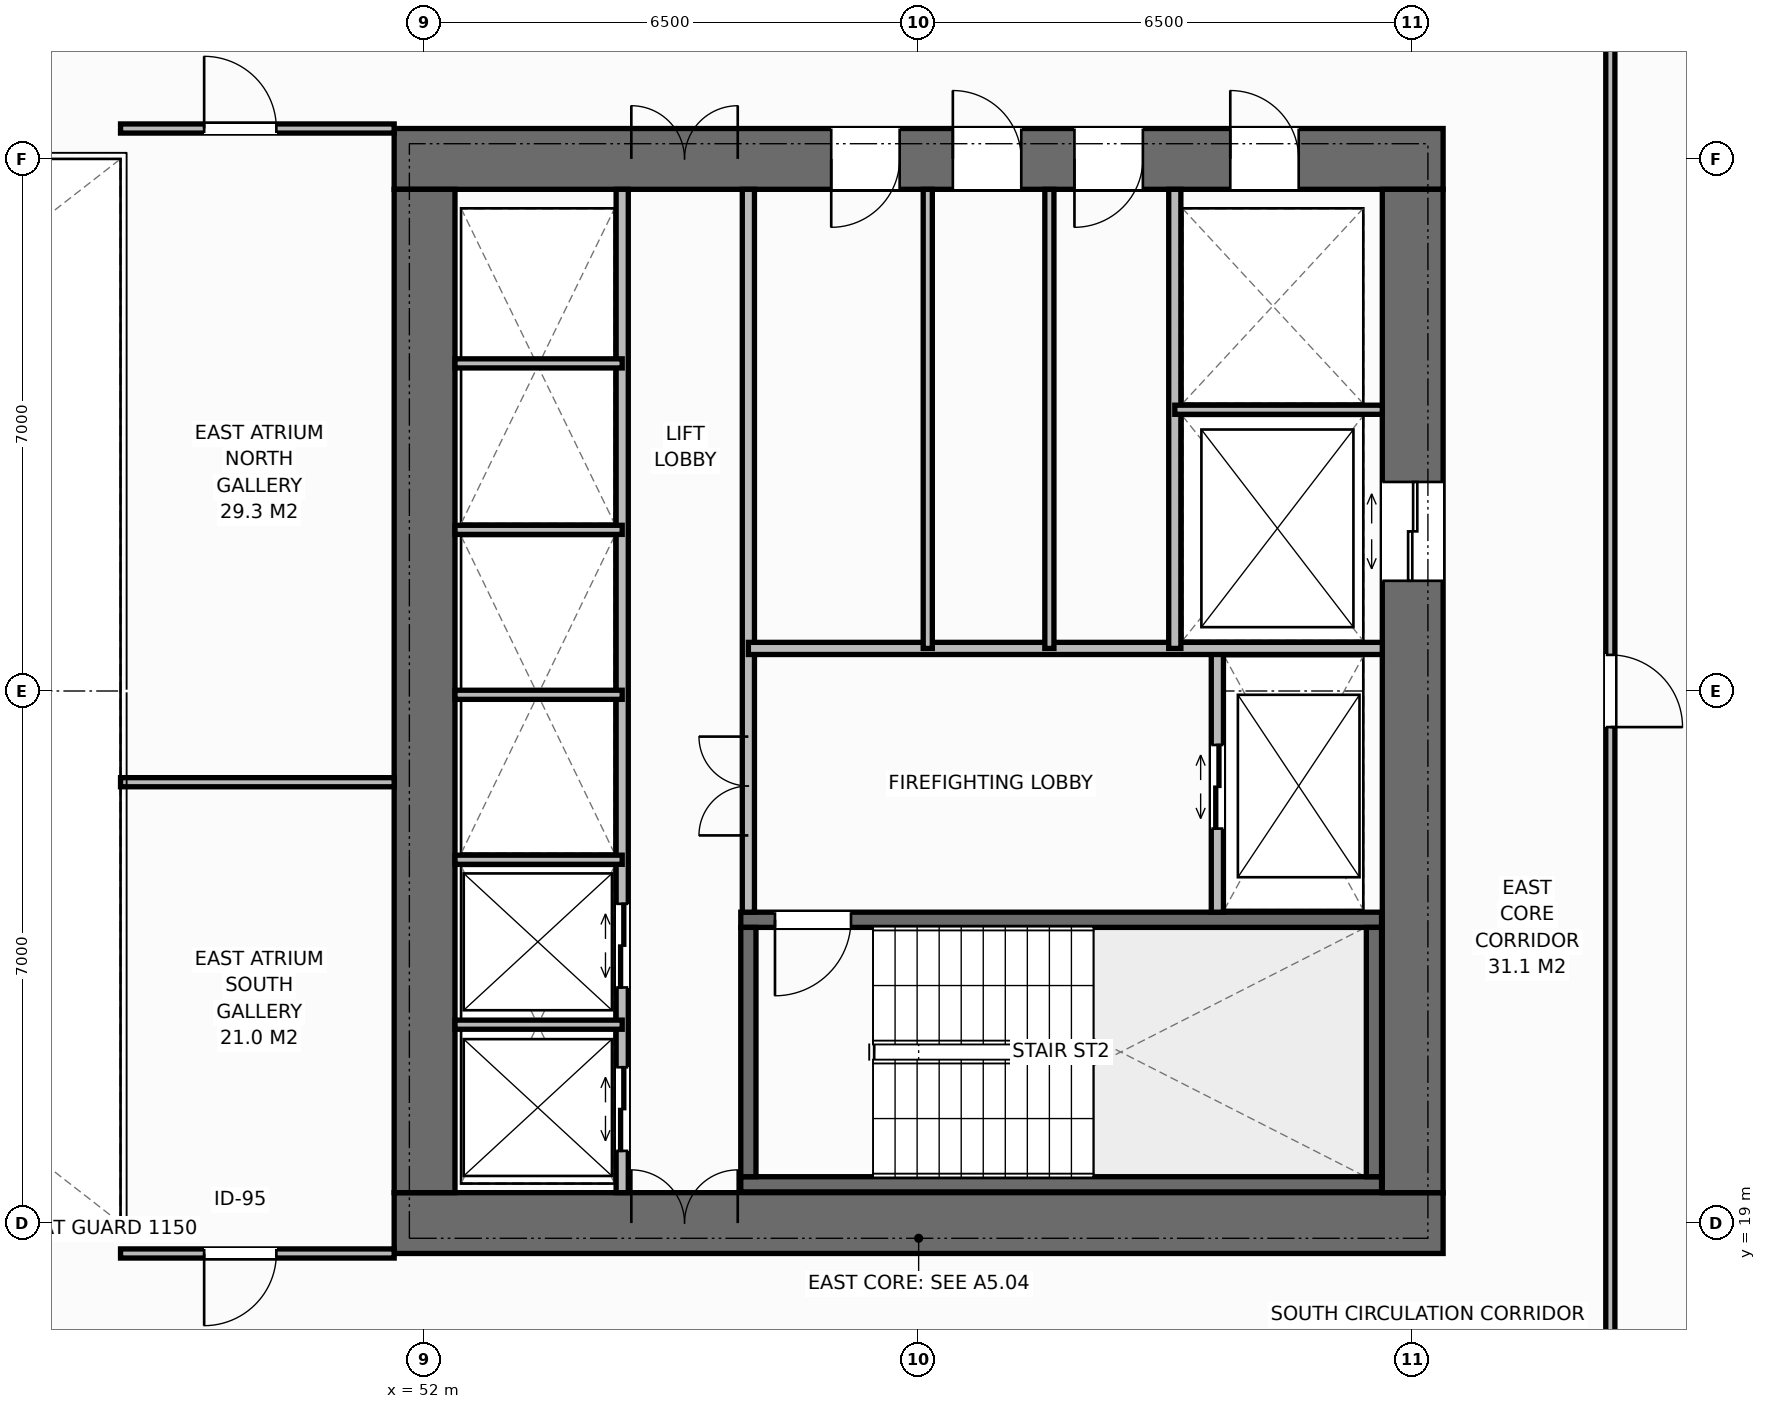
"""IFC4 building model, lengths in metres.
Left out: names, types, materials, properties, quantities, classifications, styles, units other than length and angle.
Written with IfcOpenShell. Run it as: python <this file> out.ifc"""

import sys

from ifc_helpers import new_model, si_unit, direction, frame, frame_2d, origin, place, context, subcontext, project, spatial, rectangle, extrude, element, fill, save


model = new_model("IFC4")
c1 = context("Model", 3, precision=1e-05, world=origin(), true_north=direction((0.0, 1.0)))
c2 = subcontext(c1, "Body", "Model", "MODEL_VIEW")
j1 = project(units=[si_unit("LENGTHUNIT", "METRE"), si_unit("PLANEANGLEUNIT", "RADIAN")], contexts=[c1])
p1 = place(None, origin())
s1 = spatial("IfcSite", under=j1, at=p1, CompositionType="ELEMENT")
p2 = place(p1, origin())
s2 = spatial("IfcBuilding", under=s1, at=p2, CompositionType="ELEMENT")
p3 = place(p2, frame((0.0, 0.0, 46.8)))
s3 = spatial("IfcBuildingStorey", under=s2, at=p3, CompositionType="ELEMENT", Elevation=46.8)
p4 = place(p3, frame((51.6, 19.0, 0.0), z_axis=(0.0, 0.0, 1.0), x_axis=(1.0, 0.0, 0.0)))
e1 = element("IfcWall", 1, at=p4, inside=s3, PredefinedType="SHEAR", context=c2, shape_type="SweptSolid", body=[
    extrude(rectangle(XDim=13.8, YDim=0.8, at=frame_2d((6.9, 0.0))), origin(), (0.0, 0.0, 1.0), 3.8),
])
p5 = place(p4, frame((3.12, 0.0, 0.0)))
e2 = element("IfcOpeningElement", 2, at=p5, cuts=e1, PredefinedType="OPENING", context=c2, shape_type="SweptSolid", body=[
    extrude(rectangle(XDim=1.4, YDim=2.2, at=frame_2d((0.7, 1.1))), frame((0.0, 0.41, 0.0), z_axis=(0.0, -1.0, 0.0), x_axis=(1.0, 0.0, 0.0)), (0.0, 0.0, 1.0), 0.82),
])
p6 = place(p3, frame((51.6, 33.0, 0.0), z_axis=(0.0, 0.0, 1.0), x_axis=(1.0, 0.0, 0.0)))
e3 = element("IfcWall", 3, at=p6, inside=s3, PredefinedType="SHEAR", context=c2, shape_type="SweptSolid", body=[
    extrude(rectangle(XDim=13.8, YDim=0.8, at=frame_2d((6.9, 0.0))), origin(), (0.0, 0.0, 1.0), 3.8),
])
p7 = place(p6, frame((3.12, 0.0, 0.0)))
e4 = element("IfcOpeningElement", 4, at=p7, cuts=e3, PredefinedType="OPENING", context=c2, shape_type="SweptSolid", body=[
    extrude(rectangle(XDim=1.4, YDim=2.2, at=frame_2d((0.7, 1.1))), frame((0.0, 0.41, 0.0), z_axis=(0.0, -1.0, 0.0), x_axis=(1.0, 0.0, 0.0)), (0.0, 0.0, 1.0), 0.82),
])
p8 = place(p6, frame((11.0, 0.0, 0.0)))
e5 = element("IfcOpeningElement", 5, at=p8, cuts=e3, PredefinedType="OPENING", context=c2, shape_type="SweptSolid", body=[
    extrude(rectangle(XDim=0.9, YDim=2.15, at=frame_2d((0.45, 1.075))), frame((0.0, 0.41, 0.0), z_axis=(0.0, -1.0, 0.0), x_axis=(1.0, 0.0, 0.0)), (0.0, 0.0, 1.0), 0.82),
])
p9 = place(p6, frame((5.75, 0.0, 0.0)))
e6 = element("IfcOpeningElement", 6, at=p9, cuts=e3, PredefinedType="OPENING", context=c2, shape_type="SweptSolid", body=[
    extrude(rectangle(XDim=0.9, YDim=2.15, at=frame_2d((0.45, 1.075))), frame((0.0, 0.41, 0.0), z_axis=(0.0, -1.0, 0.0), x_axis=(1.0, 0.0, 0.0)), (0.0, 0.0, 1.0), 0.82),
])
p10 = place(p6, frame((7.35, 0.0, 0.0)))
e7 = element("IfcOpeningElement", 7, at=p10, cuts=e3, PredefinedType="OPENING", context=c2, shape_type="SweptSolid", body=[
    extrude(rectangle(XDim=0.9, YDim=2.15, at=frame_2d((0.45, 1.075))), frame((0.0, 0.41, 0.0), z_axis=(0.0, -1.0, 0.0), x_axis=(1.0, 0.0, 0.0)), (0.0, 0.0, 1.0), 0.82),
])
p11 = place(p6, frame((8.95, 0.0, 0.0)))
e8 = element("IfcOpeningElement", 8, at=p11, cuts=e3, PredefinedType="OPENING", context=c2, shape_type="SweptSolid", body=[
    extrude(rectangle(XDim=0.9, YDim=2.15, at=frame_2d((0.45, 1.075))), frame((0.0, 0.41, 0.0), z_axis=(0.0, -1.0, 0.0), x_axis=(1.0, 0.0, 0.0)), (0.0, 0.0, 1.0), 0.82),
])
p12 = place(p3, frame((52.0, 19.4, 0.0), z_axis=(0.0, 0.0, 1.0), x_axis=(0.0, 1.0, 0.0)))
e9 = element("IfcWall", 9, at=p12, inside=s3, PredefinedType="SHEAR", context=c2, shape_type="SweptSolid", body=[
    extrude(rectangle(XDim=13.2, YDim=0.8, at=frame_2d((6.6, 0.0))), origin(), (0.0, 0.0, 1.0), 3.8),
])
p13 = place(p3, frame((65.0, 19.4, 0.0), z_axis=(0.0, 0.0, 1.0), x_axis=(0.0, 1.0, 0.0)))
e10 = element("IfcWall", 10, at=p13, inside=s3, PredefinedType="SHEAR", context=c2, shape_type="SweptSolid", body=[
    extrude(rectangle(XDim=13.2, YDim=0.8, at=frame_2d((6.6, 0.0))), origin(), (0.0, 0.0, 1.0), 3.8),
])
p14 = place(p13, frame((8.05, 0.0, 0.0)))
e11 = element("IfcOpeningElement", 11, at=p14, cuts=e10, PredefinedType="OPENING", context=c2, shape_type="SweptSolid", body=[
    extrude(rectangle(XDim=1.3, YDim=2.2, at=frame_2d((0.65, 1.1))), frame((0.0, 0.41, 0.0), z_axis=(0.0, -1.0, 0.0), x_axis=(1.0, 0.0, 0.0)), (0.0, 0.0, 1.0), 0.82),
])
p15 = place(p3, frame((56.16, 19.51, 0.0), z_axis=(0.0, 0.0, 1.0), x_axis=(1.0, 0.0, 0.0)))
e12 = element("IfcWall", 12, at=p15, inside=s3, PredefinedType="SHEAR", context=c2, shape_type="SweptSolid", body=[
    extrude(rectangle(XDim=8.43, YDim=0.2, at=frame_2d((4.215, 0.0))), origin(), (0.0, 0.0, 1.0), 3.8),
])
p16 = place(p3, frame((56.16, 22.99, 0.0), z_axis=(0.0, 0.0, 1.0), x_axis=(1.0, 0.0, 0.0)))
e13 = element("IfcWall", 13, at=p16, inside=s3, PredefinedType="SHEAR", context=c2, shape_type="SweptSolid", body=[
    extrude(rectangle(XDim=8.43, YDim=0.2, at=frame_2d((4.215, 0.0))), origin(), (0.0, 0.0, 1.0), 3.8),
])
p17 = place(p16, frame((0.45, 0.0, 0.0)))
e14 = element("IfcOpeningElement", 14, at=p17, cuts=e13, PredefinedType="OPENING", context=c2, shape_type="SweptSolid", body=[
    extrude(rectangle(XDim=1.0, YDim=2.15, at=frame_2d((0.5, 1.075))), frame((0.0, 0.11, 0.0), z_axis=(0.0, -1.0, 0.0), x_axis=(1.0, 0.0, 0.0)), (0.0, 0.0, 1.0), 0.22),
])
for number, where, z_axis, x_axis in (
    (15, (56.26, 19.61, 0.0), (0.0, 0.0, 1.0), (0.0, 1.0, 0.0)),
    (16, (64.49, 19.61, 0.0), (0.0, 0.0, 1.0), (0.0, 1.0, 0.0)),
):
    element("IfcWall", number, at=place(p3, frame(where, z_axis=z_axis, x_axis=x_axis)), inside=s3, PredefinedType="SHEAR", context=c2, shape_type="SweptSolid", body=[
        extrude(rectangle(XDim=3.28, YDim=0.2, at=frame_2d((1.64, 0.0))), origin(), (0.0, 0.0, 1.0), 3.8),
    ])
p18 = place(p3, frame((54.6, 19.4, 0.0), z_axis=(0.0, 0.0, 1.0), x_axis=(0.0, 1.0, 0.0)))
e17 = element("IfcWall", 17, at=p18, inside=s3, PredefinedType="STANDARD", context=c2, shape_type="SweptSolid", body=[
    extrude(rectangle(XDim=13.2, YDim=0.16, at=frame_2d((6.6, 0.0))), origin(), (0.0, 0.0, 1.0), 3.55),
])
p19 = place(p18, frame((0.55, 0.0, 0.0)))
e18 = element("IfcOpeningElement", 18, at=p19, cuts=e17, PredefinedType="OPENING", context=c2, shape_type="SweptSolid", body=[
    extrude(rectangle(XDim=1.1, YDim=2.2, at=frame_2d((0.55, 1.1))), frame((0.0, 0.09, 0.0), z_axis=(0.0, -1.0, 0.0), x_axis=(1.0, 0.0, 0.0)), (0.0, 0.0, 1.0), 0.18),
])
p20 = place(p18, frame((2.7, 0.0, 0.0)))
e19 = element("IfcOpeningElement", 19, at=p20, cuts=e17, PredefinedType="OPENING", context=c2, shape_type="SweptSolid", body=[
    extrude(rectangle(XDim=1.1, YDim=2.2, at=frame_2d((0.55, 1.1))), frame((0.0, 0.09, 0.0), z_axis=(0.0, -1.0, 0.0), x_axis=(1.0, 0.0, 0.0)), (0.0, 0.0, 1.0), 0.18),
])
p21 = place(p3, frame((56.26, 23.09, 0.0), z_axis=(0.0, 0.0, 1.0), x_axis=(0.0, 1.0, 0.0)))
e20 = element("IfcWall", 20, at=p21, inside=s3, PredefinedType="STANDARD", context=c2, shape_type="SweptSolid", body=[
    extrude(rectangle(XDim=9.51, YDim=0.16, at=frame_2d((4.755, 0.0))), origin(), (0.0, 0.0, 1.0), 3.55),
])
p22 = place(p21, frame((1.01, 0.0, 0.0)))
e21 = element("IfcOpeningElement", 21, at=p22, cuts=e20, PredefinedType="OPENING", context=c2, shape_type="SweptSolid", body=[
    extrude(rectangle(XDim=1.3, YDim=2.2, at=frame_2d((0.65, 1.1))), frame((0.0, 0.09, 0.0), z_axis=(0.0, -1.0, 0.0), x_axis=(1.0, 0.0, 0.0)), (0.0, 0.0, 1.0), 0.18),
])
for number, where, z_axis, x_axis in (
    (22, (52.4, 21.61, 0.0), (0.0, 0.0, 1.0), (1.0, 0.0, 0.0)),
    (23, (52.4, 23.78, 0.0), (0.0, 0.0, 1.0), (1.0, 0.0, 0.0)),
    (24, (52.4, 25.95, 0.0), (0.0, 0.0, 1.0), (1.0, 0.0, 0.0)),
    (25, (52.4, 28.12, 0.0), (0.0, 0.0, 1.0), (1.0, 0.0, 0.0)),
    (26, (52.4, 30.31, 0.0), (0.0, 0.0, 1.0), (1.0, 0.0, 0.0)),
):
    element("IfcWall", number, at=place(p3, frame(where, z_axis=z_axis, x_axis=x_axis)), inside=s3, PredefinedType="PARTITIONING", context=c2, shape_type="SweptSolid", body=[
        extrude(rectangle(XDim=2.2, YDim=0.12, at=frame_2d((1.1, 0.0))), origin(), (0.0, 0.0, 1.0), 3.55),
    ])
p23 = place(p3, frame((62.43, 23.09, 0.0), z_axis=(0.0, 0.0, 1.0), x_axis=(0.0, 1.0, 0.0)))
e27 = element("IfcWall", 27, at=p23, inside=s3, PredefinedType="STANDARD", context=c2, shape_type="SweptSolid", body=[
    extrude(rectangle(XDim=3.47, YDim=0.16, at=frame_2d((1.735, 0.0))), origin(), (0.0, 0.0, 1.0), 3.55),
])
p24 = place(p23, frame((1.1, 0.0, 0.0)))
e28 = element("IfcOpeningElement", 28, at=p24, cuts=e27, PredefinedType="OPENING", context=c2, shape_type="SweptSolid", body=[
    extrude(rectangle(XDim=1.1, YDim=2.2, at=frame_2d((0.55, 1.1))), frame((0.0, 0.09, 0.0), z_axis=(0.0, -1.0, 0.0), x_axis=(1.0, 0.0, 0.0)), (0.0, 0.0, 1.0), 0.18),
])
p25 = place(p3, frame((56.26, 26.56, 0.0), z_axis=(0.0, 0.0, 1.0), x_axis=(1.0, 0.0, 0.0)))
e29 = element("IfcWall", 29, at=p25, inside=s3, PredefinedType="STANDARD", context=c2, shape_type="SweptSolid", body=[
    extrude(rectangle(XDim=8.34, YDim=0.16, at=frame_2d((4.17, 0.0))), origin(), (0.0, 0.0, 1.0), 3.55),
])
p26 = place(p3, frame((61.87, 26.56, 0.0), z_axis=(0.0, 0.0, 1.0), x_axis=(0.0, 1.0, 0.0)))
e30 = element("IfcWall", 30, at=p26, inside=s3, PredefinedType="STANDARD", context=c2, shape_type="SweptSolid", body=[
    extrude(rectangle(XDim=6.04, YDim=0.16, at=frame_2d((3.02, 0.0))), origin(), (0.0, 0.0, 1.0), 3.55),
])
p27 = place(p3, frame((61.87, 29.7, 0.0), z_axis=(0.0, 0.0, 1.0), x_axis=(1.0, 0.0, 0.0)))
e31 = element("IfcWall", 31, at=p27, inside=s3, PredefinedType="PARTITIONING", context=c2, shape_type="SweptSolid", body=[
    extrude(rectangle(XDim=2.73, YDim=0.12, at=frame_2d((1.365, 0.0))), origin(), (0.0, 0.0, 1.0), 3.55),
])
for number, where, z_axis, x_axis in (
    (32, (58.62, 26.56, 0.0), (0.0, 0.0, 1.0), (0.0, 1.0, 0.0)),
    (33, (60.22, 26.56, 0.0), (0.0, 0.0, 1.0), (0.0, 1.0, 0.0)),
):
    element("IfcWall", number, at=place(p3, frame(where, z_axis=z_axis, x_axis=x_axis)), inside=s3, PredefinedType="PARTITIONING", context=c2, shape_type="SweptSolid", body=[
        extrude(rectangle(XDim=6.04, YDim=0.12, at=frame_2d((3.02, 0.0))), origin(), (0.0, 0.0, 1.0), 3.55),
    ])
p28 = place(p3, frame((48.0, 24.8, 0.0), z_axis=(0.0, 0.0, 1.0), x_axis=(1.0, 0.0, 0.0)))
e34 = element("IfcWall", 34, at=p28, inside=s3, PredefinedType="PARTITIONING", context=c2, shape_type="SweptSolid", body=[
    extrude(rectangle(XDim=3.6, YDim=0.12, at=frame_2d((1.8, 0.0))), origin(), (0.0, 0.0, 1.0), 3.55),
])
p29 = place(p3, frame((48.0, 18.6, 0.0), z_axis=(0.0, 0.0, 1.0), x_axis=(1.0, 0.0, 0.0)))
e35 = element("IfcWall", 35, at=p29, inside=s3, PredefinedType="PARTITIONING", context=c2, shape_type="SweptSolid", body=[
    extrude(rectangle(XDim=3.6, YDim=0.12, at=frame_2d((1.8, 0.0))), origin(), (0.0, 0.0, 1.0), 3.55),
])
p30 = place(p29, frame((1.1, 0.0, 0.0)))
e36 = element("IfcOpeningElement", 36, at=p30, cuts=e35, PredefinedType="OPENING", context=c2, shape_type="SweptSolid", body=[
    extrude(rectangle(XDim=0.95, YDim=2.15, at=frame_2d((0.475, 1.075))), frame((0.0, 0.07, 0.0), z_axis=(0.0, -1.0, 0.0), x_axis=(1.0, 0.0, 0.0)), (0.0, 0.0, 1.0), 0.14),
])
p31 = place(p3, frame((48.0, 33.4, 0.0), z_axis=(0.0, 0.0, 1.0), x_axis=(1.0, 0.0, 0.0)))
e37 = element("IfcWall", 37, at=p31, inside=s3, PredefinedType="PARTITIONING", context=c2, shape_type="SweptSolid", body=[
    extrude(rectangle(XDim=3.6, YDim=0.12, at=frame_2d((1.8, 0.0))), origin(), (0.0, 0.0, 1.0), 3.55),
])
p32 = place(p31, frame((1.1, 0.0, 0.0)))
e38 = element("IfcOpeningElement", 38, at=p32, cuts=e37, PredefinedType="OPENING", context=c2, shape_type="SweptSolid", body=[
    extrude(rectangle(XDim=0.95, YDim=2.15, at=frame_2d((0.475, 1.075))), frame((0.0, 0.07, 0.0), z_axis=(0.0, -1.0, 0.0), x_axis=(1.0, 0.0, 0.0)), (0.0, 0.0, 1.0), 0.14),
])
p33 = place(p3, frame((67.6, 16.5, 0.0), z_axis=(0.0, 0.0, 1.0), x_axis=(0.0, 1.0, 0.0)))
e39 = element("IfcWall", 39, at=p33, inside=s3, PredefinedType="PARTITIONING", context=c2, shape_type="SweptSolid", body=[
    extrude(rectangle(XDim=19.0, YDim=0.12, at=frame_2d((9.5, 0.0))), origin(), (0.0, 0.0, 1.0), 3.55),
])
p34 = place(p33, frame((9.025, 0.0, 0.0)))
e40 = element("IfcOpeningElement", 40, at=p34, cuts=e39, PredefinedType="OPENING", context=c2, shape_type="SweptSolid", body=[
    extrude(rectangle(XDim=0.95, YDim=2.15, at=frame_2d((0.475, 1.075))), frame((0.0, 0.07, 0.0), z_axis=(0.0, -1.0, 0.0), x_axis=(1.0, 0.0, 0.0)), (0.0, 0.0, 1.0), 0.14),
])
p35 = place(p5, origin())
e41 = element("IfcDoor", 41, at=p35, inside=s3, OperationType="DOUBLE_DOOR_SINGLE_SWING", PredefinedType="DOOR", context=c2, shape_type="SweptSolid", body=[
    extrude(rectangle(XDim=1.4, YDim=2.2, at=frame_2d((0.7, 1.1))), frame((0.0, 0.125, 0.0), z_axis=(0.0, -1.0, 0.0), x_axis=(1.0, 0.0, 0.0)), (0.0, 0.0, 1.0), 0.05),
])
fill(e2, e41)
p36 = place(p7, origin())
e42 = element("IfcDoor", 42, at=p36, inside=s3, OperationType="DOUBLE_DOOR_SINGLE_SWING", PredefinedType="DOOR", context=c2, shape_type="SweptSolid", body=[
    extrude(rectangle(XDim=1.4, YDim=2.2, at=frame_2d((0.7, 1.1))), frame((0.0, -0.075, 0.0), z_axis=(0.0, -1.0, 0.0), x_axis=(1.0, 0.0, 0.0)), (0.0, 0.0, 1.0), 0.05),
])
fill(e4, e42)
p37 = place(p19, origin())
e43 = element("IfcDoor", 43, at=p37, inside=s3, OperationType="DOUBLE_DOOR_SLIDING", PredefinedType="DOOR", context=c2, shape_type="SweptSolid", body=[
    extrude(rectangle(XDim=1.1, YDim=2.2, at=frame_2d((0.55, 1.1))), frame((0.0, 0.025, 0.0), z_axis=(0.0, -1.0, 0.0), x_axis=(1.0, 0.0, 0.0)), (0.0, 0.0, 1.0), 0.05),
])
fill(e18, e43)
p38 = place(p20, origin())
e44 = element("IfcDoor", 44, at=p38, inside=s3, OperationType="DOUBLE_DOOR_SLIDING", PredefinedType="DOOR", context=c2, shape_type="SweptSolid", body=[
    extrude(rectangle(XDim=1.1, YDim=2.2, at=frame_2d((0.55, 1.1))), frame((0.0, 0.025, 0.0), z_axis=(0.0, -1.0, 0.0), x_axis=(1.0, 0.0, 0.0)), (0.0, 0.0, 1.0), 0.05),
])
fill(e19, e44)
p39 = place(p17, origin())
e45 = element("IfcDoor", 45, at=p39, inside=s3, OperationType="SINGLE_SWING_RIGHT", PredefinedType="DOOR", context=c2, shape_type="SweptSolid", body=[
    extrude(rectangle(XDim=1.0, YDim=2.15, at=frame_2d((0.5, 1.075))), frame((0.0, 0.025, 0.0), z_axis=(0.0, -1.0, 0.0), x_axis=(1.0, 0.0, 0.0)), (0.0, 0.0, 1.0), 0.05),
])
fill(e14, e45)
p40 = place(p24, origin())
e46 = element("IfcDoor", 46, at=p40, inside=s3, OperationType="DOUBLE_DOOR_SLIDING", PredefinedType="DOOR", context=c2, shape_type="SweptSolid", body=[
    extrude(rectangle(XDim=1.1, YDim=2.2, at=frame_2d((0.55, 1.1))), frame((0.0, 0.025, 0.0), z_axis=(0.0, -1.0, 0.0), x_axis=(1.0, 0.0, 0.0)), (0.0, 0.0, 1.0), 0.05),
])
fill(e28, e46)
p41 = place(p22, origin())
e47 = element("IfcDoor", 47, at=p41, inside=s3, OperationType="DOUBLE_DOOR_SINGLE_SWING", PredefinedType="DOOR", context=c2, shape_type="SweptSolid", body=[
    extrude(rectangle(XDim=1.3, YDim=2.2, at=frame_2d((0.65, 1.1))), frame((0.0, 0.025, 0.0), z_axis=(0.0, -1.0, 0.0), x_axis=(1.0, 0.0, 0.0)), (0.0, 0.0, 1.0), 0.05),
])
fill(e21, e47)
p42 = place(p14, origin())
e48 = element("IfcDoor", 48, at=p42, inside=s3, OperationType="DOUBLE_DOOR_SLIDING", PredefinedType="DOOR", context=c2, shape_type="SweptSolid", body=[
    extrude(rectangle(XDim=1.3, YDim=2.2, at=frame_2d((0.65, 1.1))), frame((0.0, 0.025, 0.0), z_axis=(0.0, -1.0, 0.0), x_axis=(1.0, 0.0, 0.0)), (0.0, 0.0, 1.0), 0.05),
])
fill(e11, e48)
p43 = place(p8, origin())
e49 = element("IfcDoor", 49, at=p43, inside=s3, OperationType="SINGLE_SWING_LEFT", PredefinedType="DOOR", context=c2, shape_type="SweptSolid", body=[
    extrude(rectangle(XDim=0.9, YDim=2.15, at=frame_2d((0.45, 1.075))), frame((0.0, -0.075, 0.0), z_axis=(0.0, -1.0, 0.0), x_axis=(1.0, 0.0, 0.0)), (0.0, 0.0, 1.0), 0.05),
])
fill(e5, e49)
p44 = place(p9, origin())
e50 = element("IfcDoor", 50, at=p44, inside=s3, OperationType="SINGLE_SWING_RIGHT", PredefinedType="DOOR", context=c2, shape_type="SweptSolid", body=[
    extrude(rectangle(XDim=0.9, YDim=2.15, at=frame_2d((0.45, 1.075))), frame((0.0, -0.075, 0.0), z_axis=(0.0, -1.0, 0.0), x_axis=(1.0, 0.0, 0.0)), (0.0, 0.0, 1.0), 0.05),
])
fill(e6, e50)
p45 = place(p10, origin())
e51 = element("IfcDoor", 51, at=p45, inside=s3, OperationType="SINGLE_SWING_LEFT", PredefinedType="DOOR", context=c2, shape_type="SweptSolid", body=[
    extrude(rectangle(XDim=0.9, YDim=2.15, at=frame_2d((0.45, 1.075))), frame((0.0, -0.075, 0.0), z_axis=(0.0, -1.0, 0.0), x_axis=(1.0, 0.0, 0.0)), (0.0, 0.0, 1.0), 0.05),
])
fill(e7, e51)
p46 = place(p11, origin())
e52 = element("IfcDoor", 52, at=p46, inside=s3, OperationType="SINGLE_SWING_RIGHT", PredefinedType="DOOR", context=c2, shape_type="SweptSolid", body=[
    extrude(rectangle(XDim=0.9, YDim=2.15, at=frame_2d((0.45, 1.075))), frame((0.0, -0.075, 0.0), z_axis=(0.0, -1.0, 0.0), x_axis=(1.0, 0.0, 0.0)), (0.0, 0.0, 1.0), 0.05),
])
fill(e8, e52)
p47 = place(p30, origin())
e53 = element("IfcDoor", 53, at=p47, inside=s3, OperationType="SINGLE_SWING_RIGHT", PredefinedType="DOOR", context=c2, shape_type="SweptSolid", body=[
    extrude(rectangle(XDim=0.95, YDim=2.15, at=frame_2d((0.475, 1.075))), frame((0.0, 0.025, 0.0), z_axis=(0.0, -1.0, 0.0), x_axis=(1.0, 0.0, 0.0)), (0.0, 0.0, 1.0), 0.05),
])
fill(e36, e53)
p48 = place(p32, origin())
e54 = element("IfcDoor", 54, at=p48, inside=s3, OperationType="SINGLE_SWING_LEFT", PredefinedType="DOOR", context=c2, shape_type="SweptSolid", body=[
    extrude(rectangle(XDim=0.95, YDim=2.15, at=frame_2d((0.475, 1.075))), frame((0.0, 0.025, 0.0), z_axis=(0.0, -1.0, 0.0), x_axis=(1.0, 0.0, 0.0)), (0.0, 0.0, 1.0), 0.05),
])
fill(e38, e54)
p49 = place(p34, origin())
e55 = element("IfcDoor", 55, at=p49, inside=s3, OperationType="SINGLE_SWING_RIGHT", PredefinedType="DOOR", context=c2, shape_type="SweptSolid", body=[
    extrude(rectangle(XDim=0.95, YDim=2.15, at=frame_2d((0.475, 1.075))), frame((0.0, 0.025, 0.0), z_axis=(0.0, -1.0, 0.0), x_axis=(1.0, 0.0, 0.0)), (0.0, 0.0, 1.0), 0.05),
])
fill(e40, e55)
save(model, sys.argv[1])
